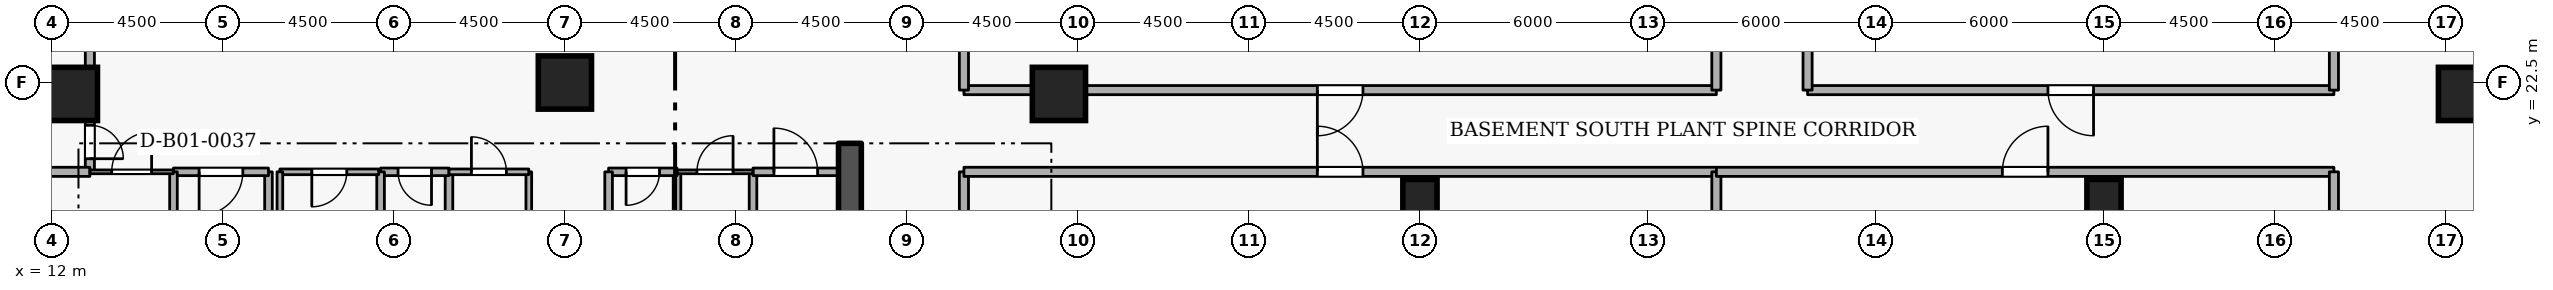
"""IFC4 building model, lengths in metres.
Left out: names, types, materials, properties, quantities, classifications, styles, units other than length and angle.
Written with IfcOpenShell. Run it as: python <this file> out.ifc"""

import sys

from ifc_helpers import new_model, si_unit, direction, frame, frame_2d, origin, origin_2d, place, context, subcontext, project, spatial, rectangle, extrude, element, fill, save


model = new_model("IFC4")
c1 = context("Model", 3, precision=1e-05, world=origin(), true_north=direction((0.0, 1.0)))
c2 = subcontext(c1, "Body", "Model", "MODEL_VIEW")
j1 = project(units=[si_unit("LENGTHUNIT", "METRE"), si_unit("PLANEANGLEUNIT", "RADIAN")], contexts=[c1])
p1 = place(None, origin())
s1 = spatial("IfcSite", under=j1, at=p1, CompositionType="ELEMENT")
p2 = place(p1, origin())
s2 = spatial("IfcBuilding", under=s1, at=p2, CompositionType="ELEMENT")
p3 = place(p2, frame((0.0, 0.0, -5.4)))
s3 = spatial("IfcBuildingStorey", under=s2, at=p3, CompositionType="ELEMENT", Elevation=-5.4)
p4 = place(p3, frame((33.0, 15.2, -0.6), z_axis=(0.0, 0.0, 1.0), x_axis=(0.0, 1.0, 0.0)))
e1 = element("IfcWall", 1, at=p4, inside=s3, PredefinedType="SHEAR", context=c2, shape_type="SweptSolid", body=[
    extrude(rectangle(XDim=5.7, YDim=0.6, at=frame_2d((2.85, 0.0))), origin(), (0.0, 0.0, 1.0), 6.0),
])
for number, where, z_axis, x_axis in (
    (2, (12.5, 22.2, -0.6), (0.0, 0.0, 1.0), (1.0, 0.0, 0.0)),
    (3, (38.5, 22.2, -0.6), (0.0, 0.0, 1.0), (1.0, 0.0, 0.0)),
    (4, (25.5, 22.5, -0.6), (0.0, 0.0, 1.0), (1.0, 0.0, 0.0)),
    (5, (75.5, 22.2, -0.6), (0.0, 0.0, 1.0), (1.0, 0.0, 0.0)),
):
    element("IfcColumn", number, at=place(p3, frame(where, z_axis=z_axis, x_axis=x_axis)), inside=s3, PredefinedType="COLUMN", context=c2, shape_type="SweptSolid", body=[
        extrude(rectangle(XDim=1.4, YDim=1.4, at=origin_2d()), origin(), (0.0, 0.0, 1.0), 6.0),
    ])
for number, where, z_axis, x_axis in (
    (6, (48.0, 19.5, -0.6), (0.0, 0.0, 1.0), (1.0, 0.0, 0.0)),
    (7, (66.0, 19.5, -0.6), (0.0, 0.0, 1.0), (1.0, 0.0, 0.0)),
):
    element("IfcColumn", number, at=place(p3, frame(where, z_axis=z_axis, x_axis=x_axis)), inside=s3, PredefinedType="COLUMN", context=c2, shape_type="SweptSolid", body=[
        extrude(rectangle(XDim=0.9, YDim=0.9, at=origin_2d()), origin(), (0.0, 0.0, 1.0), 6.0),
    ])
p5 = place(p3, frame((17.7, 18.4, 0.0), z_axis=(0.0, 0.0, 1.0), x_axis=(0.0, 1.0, 0.0)))
e8 = element("IfcWall", 8, at=p5, inside=s3, PredefinedType="STANDARD", context=c2, shape_type="SweptSolid", body=[
    extrude(rectangle(XDim=1.75, YDim=0.2, at=frame_2d((0.875, 0.0))), origin(), (0.0, 0.0, 1.0), 4.265),
])
p6 = place(p3, frame((17.7, 20.15, 0.0), z_axis=(0.0, 0.0, 1.0), x_axis=(-1.0, 0.0, 0.0)))
e9 = element("IfcWall", 9, at=p6, inside=s3, PredefinedType="STANDARD", context=c2, shape_type="SweptSolid", body=[
    extrude(rectangle(XDim=2.5, YDim=0.2, at=frame_2d((1.25, 0.0))), origin(), (0.0, 0.0, 1.0), 5.06),
])
p7 = place(p6, frame((0.675, 0.0, 0.0)))
e10 = element("IfcOpeningElement", 10, at=p7, cuts=e9, PredefinedType="OPENING", context=c2, shape_type="SweptSolid", body=[
    extrude(rectangle(XDim=1.15, YDim=2.1, at=frame_2d((0.575, 1.05))), frame((0.0, 0.11, 0.0), z_axis=(0.0, -1.0, 0.0), x_axis=(1.0, 0.0, 0.0)), (0.0, 0.0, 1.0), 0.22),
])
p8 = place(p3, frame((15.2, 20.15, 0.0), z_axis=(0.0, 0.0, 1.0), x_axis=(0.0, -1.0, 0.0)))
e11 = element("IfcWall", 11, at=p8, inside=s3, PredefinedType="STANDARD", context=c2, shape_type="SweptSolid", body=[
    extrude(rectangle(XDim=5.15, YDim=0.2, at=frame_2d((2.575, 0.0))), origin(), (0.0, 0.0, 1.0), 5.06),
])
p9 = place(p3, frame((28.45, 18.65, 0.0), z_axis=(0.0, 0.0, 1.0), x_axis=(0.0, 1.0, 0.0)))
e12 = element("IfcWall", 12, at=p9, inside=s3, PredefinedType="STANDARD", context=c2, shape_type="SweptSolid", body=[
    extrude(rectangle(XDim=1.5, YDim=0.2, at=frame_2d((0.75, 0.0))), origin(), (0.0, 0.0, 1.0), 5.06),
])
p10 = place(p3, frame((28.45, 20.15, 0.0), z_axis=(0.0, 0.0, 1.0), x_axis=(-1.0, 0.0, 0.0)))
e13 = element("IfcWall", 13, at=p10, inside=s3, PredefinedType="STANDARD", context=c2, shape_type="SweptSolid", body=[
    extrude(rectangle(XDim=1.8, YDim=0.2, at=frame_2d((0.9, 0.0))), origin(), (0.0, 0.0, 1.0), 5.06),
])
p11 = place(p10, frame((0.46, 0.0, 0.0)))
e14 = element("IfcOpeningElement", 14, at=p11, cuts=e13, PredefinedType="OPENING", context=c2, shape_type="SweptSolid", body=[
    extrude(rectangle(XDim=0.88, YDim=2.04, at=frame_2d((0.44, 1.02))), frame((0.0, 0.11, 0.0), z_axis=(0.0, -1.0, 0.0), x_axis=(1.0, 0.0, 0.0)), (0.0, 0.0, 1.0), 0.22),
])
for number, where, z_axis, x_axis in (
    (15, (26.65, 20.15, 0.0), (0.0, 0.0, 1.0), (0.0, -1.0, 0.0)),
    (16, (22.45, 18.65, 0.0), (0.0, 0.0, 1.0), (0.0, 1.0, 0.0)),
):
    element("IfcWall", number, at=place(p3, frame(where, z_axis=z_axis, x_axis=x_axis)), inside=s3, PredefinedType="STANDARD", context=c2, shape_type="SweptSolid", body=[
        extrude(rectangle(XDim=1.5, YDim=0.2, at=frame_2d((0.75, 0.0))), origin(), (0.0, 0.0, 1.0), 5.06),
    ])
p12 = place(p3, frame((22.45, 20.15, 0.0), z_axis=(0.0, 0.0, 1.0), x_axis=(-1.0, 0.0, 0.0)))
e17 = element("IfcWall", 17, at=p12, inside=s3, PredefinedType="STANDARD", context=c2, shape_type="SweptSolid", body=[
    extrude(rectangle(XDim=1.8, YDim=0.2, at=frame_2d((0.9, 0.0))), origin(), (0.0, 0.0, 1.0), 5.06),
])
p13 = place(p12, frame((0.46, 0.0, 0.0)))
e18 = element("IfcOpeningElement", 18, at=p13, cuts=e17, PredefinedType="OPENING", context=c2, shape_type="SweptSolid", body=[
    extrude(rectangle(XDim=0.88, YDim=2.04, at=frame_2d((0.44, 1.02))), frame((0.0, 0.11, 0.0), z_axis=(0.0, -1.0, 0.0), x_axis=(1.0, 0.0, 0.0)), (0.0, 0.0, 1.0), 0.22),
])
for number, where, z_axis, x_axis in (
    (19, (20.65, 20.15, 0.0), (0.0, 0.0, 1.0), (0.0, -1.0, 0.0)),
    (20, (30.45, 18.65, 0.0), (0.0, 0.0, 1.0), (0.0, 1.0, 0.0)),
):
    element("IfcWall", number, at=place(p3, frame(where, z_axis=z_axis, x_axis=x_axis)), inside=s3, PredefinedType="STANDARD", context=c2, shape_type="SweptSolid", body=[
        extrude(rectangle(XDim=1.5, YDim=0.2, at=frame_2d((0.75, 0.0))), origin(), (0.0, 0.0, 1.0), 5.06),
    ])
p14 = place(p3, frame((30.45, 20.15, 0.0), z_axis=(0.0, 0.0, 1.0), x_axis=(1.0, 0.0, 0.0)))
e21 = element("IfcWall", 21, at=p14, inside=s3, PredefinedType="STANDARD", context=c2, shape_type="SweptSolid", body=[
    extrude(rectangle(XDim=2.25, YDim=0.2, at=frame_2d((1.125, 0.0))), origin(), (0.0, 0.0, 1.0), 5.06),
])
p15 = place(p14, frame((0.55, 0.0, 0.0)))
e22 = element("IfcOpeningElement", 22, at=p15, cuts=e21, PredefinedType="OPENING", context=c2, shape_type="SweptSolid", body=[
    extrude(rectangle(XDim=1.15, YDim=2.1, at=frame_2d((0.575, 1.05))), frame((0.0, 0.11, 0.0), z_axis=(0.0, -1.0, 0.0), x_axis=(1.0, 0.0, 0.0)), (0.0, 0.0, 1.0), 0.22),
])
p16 = place(p3, frame((36.0, 6.0, 0.0), z_axis=(0.0, 0.0, 1.0), x_axis=(0.0, 1.0, 0.0)))
e23 = element("IfcWall", 23, at=p16, inside=s3, PredefinedType="STANDARD", context=c2, shape_type="SweptSolid", body=[
    extrude(rectangle(XDim=14.15, YDim=0.24, at=frame_2d((7.075, 0.0))), origin(), (0.0, 0.0, 1.0), 5.06),
])
p17 = place(p3, frame((36.0, 20.15, 0.0), z_axis=(0.0, 0.0, 1.0), x_axis=(1.0, 0.0, 0.0)))
e24 = element("IfcWall", 24, at=p17, inside=s3, PredefinedType="STANDARD", context=c2, shape_type="SweptSolid", body=[
    extrude(rectangle(XDim=19.8, YDim=0.24, at=frame_2d((9.9, 0.0))), origin(), (0.0, 0.0, 1.0), 5.06),
])
p18 = place(p17, frame((9.3, 0.0, 0.0)))
e25 = element("IfcOpeningElement", 25, at=p18, cuts=e24, PredefinedType="OPENING", context=c2, shape_type="SweptSolid", body=[
    extrude(rectangle(XDim=1.2, YDim=2.1, at=frame_2d((0.6, 1.05))), frame((0.0, 0.13, 0.0), z_axis=(0.0, -1.0, 0.0), x_axis=(1.0, 0.0, 0.0)), (0.0, 0.0, 1.0), 0.26),
])
p19 = place(p3, frame((55.8, 20.15, 0.0), z_axis=(0.0, 0.0, 1.0), x_axis=(0.0, -1.0, 0.0)))
e26 = element("IfcWall", 26, at=p19, inside=s3, PredefinedType="STANDARD", context=c2, shape_type="SweptSolid", body=[
    extrude(rectangle(XDim=14.15, YDim=0.24, at=frame_2d((7.075, 0.0))), origin(), (0.0, 0.0, 1.0), 5.06),
])
p20 = place(p3, frame((55.8, 20.15, 0.0), z_axis=(0.0, 0.0, 1.0), x_axis=(1.0, 0.0, 0.0)))
e27 = element("IfcWall", 27, at=p20, inside=s3, PredefinedType="STANDARD", context=c2, shape_type="SweptSolid", body=[
    extrude(rectangle(XDim=16.25, YDim=0.24, at=frame_2d((8.125, 0.0))), origin(), (0.0, 0.0, 1.0), 5.06),
])
p21 = place(p20, frame((7.525, 0.0, 0.0)))
e28 = element("IfcOpeningElement", 28, at=p21, cuts=e27, PredefinedType="OPENING", context=c2, shape_type="SweptSolid", body=[
    extrude(rectangle(XDim=1.2, YDim=2.1, at=frame_2d((0.6, 1.05))), frame((0.0, 0.13, 0.0), z_axis=(0.0, -1.0, 0.0), x_axis=(1.0, 0.0, 0.0)), (0.0, 0.0, 1.0), 0.26),
])
p22 = place(p3, frame((72.05, 20.15, 0.0), z_axis=(0.0, 0.0, 1.0), x_axis=(0.0, -1.0, 0.0)))
e29 = element("IfcWall", 29, at=p22, inside=s3, PredefinedType="STANDARD", context=c2, shape_type="SweptSolid", body=[
    extrude(rectangle(XDim=14.15, YDim=0.24, at=frame_2d((7.075, 0.0))), origin(), (0.0, 0.0, 1.0), 5.06),
])
p23 = place(p3, frame((55.8, 22.3, 0.0), z_axis=(0.0, 0.0, 1.0), x_axis=(-1.0, 0.0, 0.0)))
e30 = element("IfcWall", 30, at=p23, inside=s3, PredefinedType="STANDARD", context=c2, shape_type="SweptSolid", body=[
    extrude(rectangle(XDim=19.8, YDim=0.24, at=frame_2d((9.9, 0.0))), origin(), (0.0, 0.0, 1.0), 5.06),
])
p24 = place(p23, frame((9.3, 0.0, 0.0)))
e31 = element("IfcOpeningElement", 31, at=p24, cuts=e30, PredefinedType="OPENING", context=c2, shape_type="SweptSolid", body=[
    extrude(rectangle(XDim=1.2, YDim=2.1, at=frame_2d((0.6, 1.05))), frame((0.0, 0.13, 0.0), z_axis=(0.0, -1.0, 0.0), x_axis=(1.0, 0.0, 0.0)), (0.0, 0.0, 1.0), 0.26),
])
for number, where, z_axis, x_axis in (
    (32, (36.0, 22.3, 0.0), (0.0, 0.0, 1.0), (0.0, 1.0, 0.0)),
    (33, (55.8, 32.28, 0.0), (0.0, 0.0, 1.0), (0.0, -1.0, 0.0)),
):
    element("IfcWall", number, at=place(p3, frame(where, z_axis=z_axis, x_axis=x_axis)), inside=s3, PredefinedType="STANDARD", context=c2, shape_type="SweptSolid", body=[
        extrude(rectangle(XDim=9.98, YDim=0.24, at=frame_2d((4.99, 0.0))), origin(), (0.0, 0.0, 1.0), 5.06),
    ])
p25 = place(p3, frame((72.05, 22.3, 0.0), z_axis=(0.0, 0.0, 1.0), x_axis=(-1.0, 0.0, 0.0)))
e34 = element("IfcWall", 34, at=p25, inside=s3, PredefinedType="STANDARD", context=c2, shape_type="SweptSolid", body=[
    extrude(rectangle(XDim=13.85, YDim=0.24, at=frame_2d((6.925, 0.0))), origin(), (0.0, 0.0, 1.0), 5.06),
])
p26 = place(p25, frame((6.325, 0.0, 0.0)))
e35 = element("IfcOpeningElement", 35, at=p26, cuts=e34, PredefinedType="OPENING", context=c2, shape_type="SweptSolid", body=[
    extrude(rectangle(XDim=1.2, YDim=2.1, at=frame_2d((0.6, 1.05))), frame((0.0, 0.13, 0.0), z_axis=(0.0, -1.0, 0.0), x_axis=(1.0, 0.0, 0.0)), (0.0, 0.0, 1.0), 0.26),
])
for number, where, z_axis, x_axis in (
    (36, (58.2, 22.3, 0.0), (0.0, 0.0, 1.0), (0.0, 1.0, 0.0)),
    (37, (72.05, 32.28, 0.0), (0.0, 0.0, 1.0), (0.0, -1.0, 0.0)),
    (38, (13.0, 31.7, 0.0), (0.0, 0.0, 1.0), (0.0, -1.0, 0.0)),
):
    element("IfcWall", number, at=place(p3, frame(where, z_axis=z_axis, x_axis=x_axis)), inside=s3, PredefinedType="STANDARD", context=c2, shape_type="SweptSolid", body=[
        extrude(rectangle(XDim=9.98, YDim=0.24, at=frame_2d((4.99, 0.0))), origin(), (0.0, 0.0, 1.0), 5.06),
    ])
p27 = place(p3, frame((13.0, 21.72, 0.0), z_axis=(0.0, 0.0, 1.0), x_axis=(0.0, -1.0, 0.0)))
e39 = element("IfcWall", 39, at=p27, inside=s3, PredefinedType="STANDARD", context=c2, shape_type="SweptSolid", body=[
    extrude(rectangle(XDim=1.57, YDim=0.24, at=frame_2d((0.785, 0.0))), origin(), (0.0, 0.0, 1.0), 5.06),
])
p28 = place(p27, frame((0.345, 0.0, 0.0)))
e40 = element("IfcOpeningElement", 40, at=p28, cuts=e39, PredefinedType="OPENING", context=c2, shape_type="SweptSolid", body=[
    extrude(rectangle(XDim=0.88, YDim=2.04, at=frame_2d((0.44, 1.02))), frame((0.0, 0.13, 0.0), z_axis=(0.0, -1.0, 0.0), x_axis=(1.0, 0.0, 0.0)), (0.0, 0.0, 1.0), 0.26),
])
p29 = place(p3, frame((13.0, 20.15, 0.0), z_axis=(0.0, 0.0, 1.0), x_axis=(-1.0, 0.0, 0.0)))
e41 = element("IfcWall", 41, at=p29, inside=s3, PredefinedType="STANDARD", context=c2, shape_type="SweptSolid", body=[
    extrude(rectangle(XDim=7.5, YDim=0.24, at=frame_2d((3.75, 0.0))), origin(), (0.0, 0.0, 1.0), 5.06),
])
p30 = place(p3, frame((20.6, 20.15, 0.0), z_axis=(0.0, 0.0, 1.0), x_axis=(-1.0, 0.0, 0.0)))
e42 = element("IfcWall", 42, at=p30, inside=s3, PredefinedType="PARTITIONING", context=c2, shape_type="SweptSolid", body=[
    extrude(rectangle(XDim=2.6, YDim=0.15, at=frame_2d((1.3, 0.0))), origin(), (0.0, 0.0, 1.0), 5.06),
])
p31 = place(p30, frame((0.84, 0.0, 0.0)))
e43 = element("IfcOpeningElement", 43, at=p31, cuts=e42, PredefinedType="OPENING", context=c2, shape_type="SweptSolid", body=[
    extrude(rectangle(XDim=0.92, YDim=2.08, at=frame_2d((0.46, 1.04))), frame((0.0, 0.085, 0.0), z_axis=(0.0, -1.0, 0.0), x_axis=(1.0, 0.0, 0.0)), (0.0, 0.0, 1.0), 0.17),
])
p32 = place(p3, frame((18.0, 20.15, 0.0), z_axis=(0.0, 0.0, 1.0), x_axis=(0.0, -1.0, 0.0)))
e44 = element("IfcWall", 44, at=p32, inside=s3, PredefinedType="PARTITIONING", context=c2, shape_type="SweptSolid", body=[
    extrude(rectangle(XDim=1.5, YDim=0.15, at=frame_2d((0.75, 0.0))), origin(), (0.0, 0.0, 1.0), 4.265),
])
p33 = place(p3, frame((24.55, 20.15, 0.0), z_axis=(0.0, 0.0, 1.0), x_axis=(0.0, -1.0, 0.0)))
e45 = element("IfcWall", 45, at=p33, inside=s3, PredefinedType="PARTITIONING", context=c2, shape_type="SweptSolid", body=[
    extrude(rectangle(XDim=1.5, YDim=0.15, at=frame_2d((0.75, 0.0))), origin(), (0.0, 0.0, 1.0), 5.06),
])
p34 = place(p3, frame((22.45, 20.15, 0.0), z_axis=(0.0, 0.0, 1.0), x_axis=(1.0, 0.0, 0.0)))
e46 = element("IfcWall", 46, at=p34, inside=s3, PredefinedType="PARTITIONING", context=c2, shape_type="SweptSolid", body=[
    extrude(rectangle(XDim=2.1, YDim=0.15, at=frame_2d((1.05, 0.0))), origin(), (0.0, 0.0, 1.0), 5.06),
])
p35 = place(p34, frame((0.59, 0.0, 0.0)))
e47 = element("IfcOpeningElement", 47, at=p35, cuts=e46, PredefinedType="OPENING", context=c2, shape_type="SweptSolid", body=[
    extrude(rectangle(XDim=0.92, YDim=2.08, at=frame_2d((0.46, 1.04))), frame((0.0, 0.085, 0.0), z_axis=(0.0, -1.0, 0.0), x_axis=(1.0, 0.0, 0.0)), (0.0, 0.0, 1.0), 0.17),
])
p36 = place(p3, frame((28.45, 20.15, 0.0), z_axis=(0.0, 0.0, 1.0), x_axis=(1.0, 0.0, 0.0)))
e48 = element("IfcWall", 48, at=p36, inside=s3, PredefinedType="PARTITIONING", context=c2, shape_type="SweptSolid", body=[
    extrude(rectangle(XDim=2.0, YDim=0.1, at=frame_2d((1.0, 0.0))), origin(), (0.0, 0.0, 1.0), 5.06),
])
p37 = place(p36, frame((0.525, 0.0, 0.0)))
e49 = element("IfcOpeningElement", 49, at=p37, cuts=e48, PredefinedType="OPENING", context=c2, shape_type="SweptSolid", body=[
    extrude(rectangle(XDim=0.95, YDim=2.1, at=frame_2d((0.475, 1.05))), frame((0.0, 0.06, 0.0), z_axis=(0.0, -1.0, 0.0), x_axis=(1.0, 0.0, 0.0)), (0.0, 0.0, 1.0), 0.12),
])
p38 = place(p3, frame((13.0, 20.15, 0.0), z_axis=(0.0, 0.0, 1.0), x_axis=(1.0, 0.0, 0.0)))
e50 = element("IfcWall", 50, at=p38, inside=s3, PredefinedType="PARTITIONING", context=c2, shape_type="SweptSolid", body=[
    extrude(rectangle(XDim=2.2, YDim=0.1, at=frame_2d((1.1, 0.0))), origin(), (0.0, 0.0, 1.0), 5.06),
])
p39 = place(p38, frame((0.575, 0.0, 0.0)))
e51 = element("IfcOpeningElement", 51, at=p39, cuts=e50, PredefinedType="OPENING", context=c2, shape_type="SweptSolid", body=[
    extrude(rectangle(XDim=1.05, YDim=2.1, at=frame_2d((0.525, 1.05))), frame((0.0, 0.06, 0.0), z_axis=(0.0, -1.0, 0.0), x_axis=(1.0, 0.0, 0.0)), (0.0, 0.0, 1.0), 0.12),
])
p40 = place(p7, origin())
e52 = element("IfcDoor", 52, at=p40, inside=s3, OperationType="SINGLE_SWING_RIGHT", PredefinedType="DOOR", context=c2, shape_type="SweptSolid", body=[
    extrude(rectangle(XDim=1.15, YDim=2.1, at=frame_2d((0.575, 1.05))), frame((0.0, 0.025, 0.0), z_axis=(0.0, -1.0, 0.0), x_axis=(1.0, 0.0, 0.0)), (0.0, 0.0, 1.0), 0.05),
])
fill(e10, e52)
p41 = place(p11, origin())
e53 = element("IfcDoor", 53, at=p41, inside=s3, OperationType="SINGLE_SWING_RIGHT", PredefinedType="DOOR", context=c2, shape_type="SweptSolid", body=[
    extrude(rectangle(XDim=0.88, YDim=2.04, at=frame_2d((0.44, 1.02))), frame((0.0, 0.025, 0.0), z_axis=(0.0, -1.0, 0.0), x_axis=(1.0, 0.0, 0.0)), (0.0, 0.0, 1.0), 0.05),
])
fill(e14, e53)
p42 = place(p13, origin())
e54 = element("IfcDoor", 54, at=p42, inside=s3, OperationType="SINGLE_SWING_LEFT", PredefinedType="DOOR", context=c2, shape_type="SweptSolid", body=[
    extrude(rectangle(XDim=0.88, YDim=2.04, at=frame_2d((0.44, 1.02))), frame((0.0, 0.025, 0.0), z_axis=(0.0, -1.0, 0.0), x_axis=(1.0, 0.0, 0.0)), (0.0, 0.0, 1.0), 0.05),
])
fill(e18, e54)
p43 = place(p31, origin())
e55 = element("IfcDoor", 55, at=p43, inside=s3, OperationType="SINGLE_SWING_RIGHT", PredefinedType="DOOR", context=c2, shape_type="SweptSolid", body=[
    extrude(rectangle(XDim=0.92, YDim=2.08, at=frame_2d((0.46, 1.04))), frame((0.0, 0.025, 0.0), z_axis=(0.0, -1.0, 0.0), x_axis=(1.0, 0.0, 0.0)), (0.0, 0.0, 1.0), 0.05),
])
fill(e43, e55)
p44 = place(p35, origin())
e56 = element("IfcDoor", 56, at=p44, inside=s3, OperationType="SINGLE_SWING_LEFT", PredefinedType="DOOR", context=c2, shape_type="SweptSolid", body=[
    extrude(rectangle(XDim=0.92, YDim=2.08, at=frame_2d((0.46, 1.04))), frame((0.0, 0.025, 0.0), z_axis=(0.0, -1.0, 0.0), x_axis=(1.0, 0.0, 0.0)), (0.0, 0.0, 1.0), 0.05),
])
fill(e47, e56)
p45 = place(p37, origin())
e57 = element("IfcDoor", 57, at=p45, inside=s3, OperationType="SINGLE_SWING_RIGHT", PredefinedType="DOOR", context=c2, shape_type="SweptSolid", body=[
    extrude(rectangle(XDim=0.95, YDim=2.1, at=frame_2d((0.475, 1.05))), frame((0.0, 0.025, 0.0), z_axis=(0.0, -1.0, 0.0), x_axis=(1.0, 0.0, 0.0)), (0.0, 0.0, 1.0), 0.05),
])
fill(e49, e57)
p46 = place(p15, origin())
e58 = element("IfcDoor", 58, at=p46, inside=s3, OperationType="SINGLE_SWING_LEFT", PredefinedType="DOOR", context=c2, shape_type="SweptSolid", body=[
    extrude(rectangle(XDim=1.15, YDim=2.1, at=frame_2d((0.575, 1.05))), frame((0.0, 0.025, 0.0), z_axis=(0.0, -1.0, 0.0), x_axis=(1.0, 0.0, 0.0)), (0.0, 0.0, 1.0), 0.05),
])
fill(e22, e58)
p47 = place(p39, origin())
e59 = element("IfcDoor", 59, at=p47, inside=s3, OperationType="SINGLE_SWING_RIGHT", PredefinedType="DOOR", context=c2, shape_type="SweptSolid", body=[
    extrude(rectangle(XDim=1.05, YDim=2.1, at=frame_2d((0.525, 1.05))), frame((0.0, 0.025, 0.0), z_axis=(0.0, -1.0, 0.0), x_axis=(1.0, 0.0, 0.0)), (0.0, 0.0, 1.0), 0.05),
])
fill(e51, e59)
p48 = place(p18, origin())
e60 = element("IfcDoor", 60, at=p48, inside=s3, OperationType="SINGLE_SWING_LEFT", PredefinedType="DOOR", context=c2, shape_type="SweptSolid", body=[
    extrude(rectangle(XDim=1.2, YDim=2.1, at=frame_2d((0.6, 1.05))), frame((0.0, 0.025, 0.0), z_axis=(0.0, -1.0, 0.0), x_axis=(1.0, 0.0, 0.0)), (0.0, 0.0, 1.0), 0.05),
])
fill(e25, e60)
p49 = place(p21, origin())
e61 = element("IfcDoor", 61, at=p49, inside=s3, OperationType="SINGLE_SWING_RIGHT", PredefinedType="DOOR", context=c2, shape_type="SweptSolid", body=[
    extrude(rectangle(XDim=1.2, YDim=2.1, at=frame_2d((0.6, 1.05))), frame((0.0, 0.025, 0.0), z_axis=(0.0, -1.0, 0.0), x_axis=(1.0, 0.0, 0.0)), (0.0, 0.0, 1.0), 0.05),
])
fill(e28, e61)
p50 = place(p24, origin())
e62 = element("IfcDoor", 62, at=p50, inside=s3, OperationType="SINGLE_SWING_RIGHT", PredefinedType="DOOR", context=c2, shape_type="SweptSolid", body=[
    extrude(rectangle(XDim=1.2, YDim=2.1, at=frame_2d((0.6, 1.05))), frame((0.0, 0.025, 0.0), z_axis=(0.0, -1.0, 0.0), x_axis=(1.0, 0.0, 0.0)), (0.0, 0.0, 1.0), 0.05),
])
fill(e31, e62)
p51 = place(p26, origin())
e63 = element("IfcDoor", 63, at=p51, inside=s3, OperationType="SINGLE_SWING_LEFT", PredefinedType="DOOR", context=c2, shape_type="SweptSolid", body=[
    extrude(rectangle(XDim=1.2, YDim=2.1, at=frame_2d((0.6, 1.05))), frame((0.0, 0.025, 0.0), z_axis=(0.0, -1.0, 0.0), x_axis=(1.0, 0.0, 0.0)), (0.0, 0.0, 1.0), 0.05),
])
fill(e35, e63)
p52 = place(p28, origin())
e64 = element("IfcDoor", 64, at=p52, inside=s3, OperationType="SINGLE_SWING_RIGHT", PredefinedType="DOOR", context=c2, shape_type="SweptSolid", body=[
    extrude(rectangle(XDim=0.88, YDim=2.04, at=frame_2d((0.44, 1.02))), frame((0.0, 0.025, 0.0), z_axis=(0.0, -1.0, 0.0), x_axis=(1.0, 0.0, 0.0)), (0.0, 0.0, 1.0), 0.05),
])
fill(e40, e64)
save(model, sys.argv[1])
